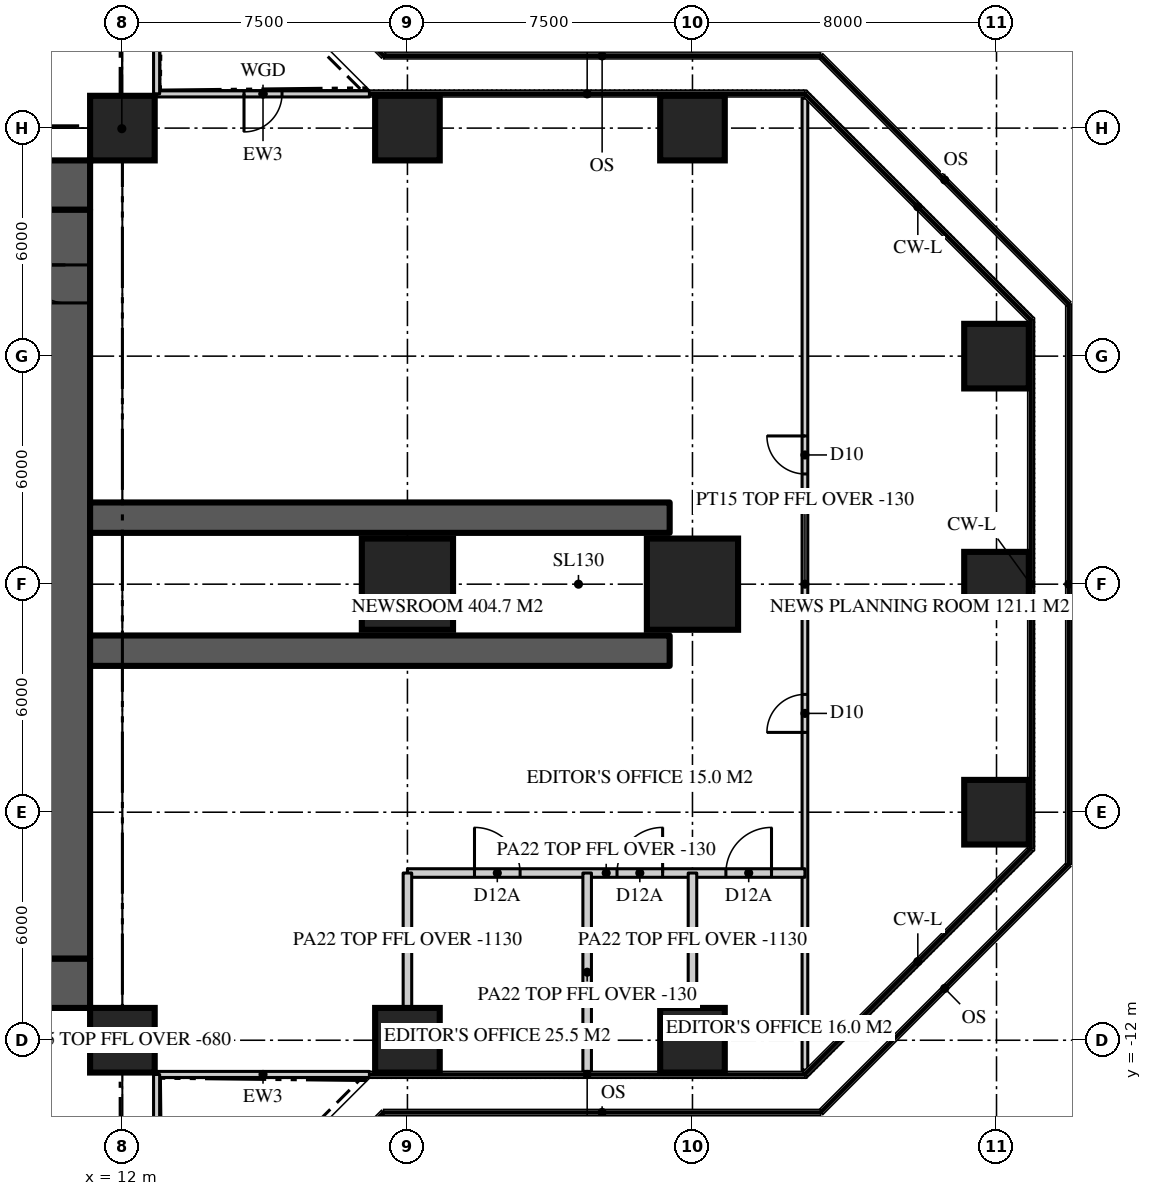
"""IFC4 building model, lengths in metres.
Left out: names, types, materials, properties, quantities, classifications, styles, units other than length and angle.
Written with IfcOpenShell. Run it as: python <this file> out.ifc"""

import sys

from ifc_helpers import new_model, si_unit, direction, frame, frame_2d, origin, origin_2d, place, context, subcontext, project, spatial, rectangle, extrude, element, fill, save


model = new_model("IFC4")
c1 = context("Model", 3, precision=1e-05, world=origin(), true_north=direction((0.0, 1.0)))
c2 = subcontext(c1, "Body", "Model", "MODEL_VIEW")
j1 = project(units=[si_unit("LENGTHUNIT", "METRE"), si_unit("PLANEANGLEUNIT", "RADIAN")], contexts=[c1])
p1 = place(None, origin())
s1 = spatial("IfcSite", under=j1, at=p1, CompositionType="ELEMENT")
p2 = place(p1, origin())
s2 = spatial("IfcBuilding", under=s1, at=p2, CompositionType="ELEMENT")
p3 = place(p2, frame((0.0, 0.0, 51.3)))
s3 = spatial("IfcBuildingStorey", under=s2, at=p3, CompositionType="ELEMENT", Elevation=51.3)
p4 = place(p3, frame((-11.15, 10.5, 0.0), z_axis=(0.0, 0.0, 1.0), x_axis=(1.0, 0.0, 0.0)))
e1 = element("IfcWall", 1, at=p4, inside=s3, PredefinedType="SHEAR", context=c2, shape_type="SweptSolid", body=[
    extrude(rectangle(XDim=22.3, YDim=1.3, at=frame_2d((11.15, 0.0))), origin(), (0.0, 0.0, 1.0), 3.9),
])
p5 = place(p4, frame((4.25, 0.0, 0.0)))
e2 = element("IfcOpeningElement", 2, at=p5, cuts=e1, PredefinedType="OPENING", context=c2, shape_type="SweptSolid", body=[
    extrude(rectangle(XDim=1.8, YDim=2.2, at=frame_2d((0.9, 1.1))), frame((0.0, 0.66, 0.0), z_axis=(0.0, -1.0, 0.0), x_axis=(1.0, 0.0, 0.0)), (0.0, 0.0, 1.0), 1.32),
])
p6 = place(p4, frame((16.25, 0.0, 0.0)))
e3 = element("IfcOpeningElement", 3, at=p6, cuts=e1, PredefinedType="OPENING", context=c2, shape_type="SweptSolid", body=[
    extrude(rectangle(XDim=1.8, YDim=2.2, at=frame_2d((0.9, 1.1))), frame((0.0, 0.66, 0.0), z_axis=(0.0, -1.0, 0.0), x_axis=(1.0, 0.0, 0.0)), (0.0, 0.0, 1.0), 1.32),
])
p7 = place(p3, frame((11.15, -10.5, 0.0), z_axis=(0.0, 0.0, 1.0), x_axis=(-1.0, 0.0, 0.0)))
e4 = element("IfcWall", 4, at=p7, inside=s3, PredefinedType="SHEAR", context=c2, shape_type="SweptSolid", body=[
    extrude(rectangle(XDim=22.3, YDim=1.3, at=frame_2d((11.15, 0.0))), origin(), (0.0, 0.0, 1.0), 3.9),
])
p8 = place(p7, frame((16.25, 0.0, 0.0)))
e5 = element("IfcOpeningElement", 5, at=p8, cuts=e4, PredefinedType="OPENING", context=c2, shape_type="SweptSolid", body=[
    extrude(rectangle(XDim=1.8, YDim=2.2, at=frame_2d((0.9, 1.1))), frame((0.0, 0.66, 0.0), z_axis=(0.0, -1.0, 0.0), x_axis=(1.0, 0.0, 0.0)), (0.0, 0.0, 1.0), 1.32),
])
p9 = place(p7, frame((4.25, 0.0, 0.0)))
e6 = element("IfcOpeningElement", 6, at=p9, cuts=e4, PredefinedType="OPENING", context=c2, shape_type="SweptSolid", body=[
    extrude(rectangle(XDim=1.8, YDim=2.2, at=frame_2d((0.9, 1.1))), frame((0.0, 0.66, 0.0), z_axis=(0.0, -1.0, 0.0), x_axis=(1.0, 0.0, 0.0)), (0.0, 0.0, 1.0), 1.32),
])
p10 = place(p3, frame((10.5, -9.85, 0.0), z_axis=(0.0, 0.0, 1.0), x_axis=(0.0, 1.0, 0.0)))
e7 = element("IfcWall", 7, at=p10, inside=s3, PredefinedType="SHEAR", context=c2, shape_type="SweptSolid", body=[
    extrude(rectangle(XDim=19.7, YDim=1.3, at=frame_2d((9.85, 0.0))), origin(), (0.0, 0.0, 1.0), 3.9),
])
p11 = place(p10, frame((17.25, 0.0, 0.0)))
e8 = element("IfcOpeningElement", 8, at=p11, cuts=e7, PredefinedType="OPENING", context=c2, shape_type="SweptSolid", body=[
    extrude(rectangle(XDim=1.0, YDim=2.2, at=frame_2d((0.5, 1.1))), frame((0.0, 0.66, 0.0), z_axis=(0.0, -1.0, 0.0), x_axis=(1.0, 0.0, 0.0)), (0.0, 0.0, 1.0), 1.32),
])
for number, where, z_axis, x_axis in (
    (9, (11.15, -1.75, 0.0), (0.0, 0.0, 1.0), (1.0, 0.0, 0.0)),
    (10, (11.15, 1.75, 0.0), (0.0, 0.0, 1.0), (1.0, 0.0, 0.0)),
):
    element("IfcWall", number, at=place(p3, frame(where, z_axis=z_axis, x_axis=x_axis)), inside=s3, PredefinedType="SHEAR", context=c2, shape_type="SweptSolid", body=[
        extrude(rectangle(XDim=15.25, YDim=0.8, at=frame_2d((7.625, 0.0))), origin(), (0.0, 0.0, 1.0), 3.9),
    ])
for number, where, z_axis, x_axis in (
    (11, (12.0, -12.0, 0.0), (0.0, 0.0, 1.0), (1.0, 0.0, 0.0)),
    (12, (19.5, -12.0, 0.0), (0.0, 0.0, 1.0), (1.0, 0.0, 0.0)),
    (13, (27.0, -12.0, 0.0), (0.0, 0.0, 1.0), (1.0, 0.0, 0.0)),
    (14, (35.0, -6.0, 0.0), (0.0, 0.0, 1.0), (1.0, 0.0, 0.0)),
):
    element("IfcColumn", number, at=place(p3, frame(where, z_axis=z_axis, x_axis=x_axis)), inside=s3, PredefinedType="COLUMN", context=c2, shape_type="SweptSolid", body=[
        extrude(rectangle(XDim=1.7, YDim=1.7, at=origin_2d()), origin(), (0.0, 0.0, 1.0), 3.9),
    ])
for number, where, z_axis, x_axis in (
    (15, (19.5, 0.0, 0.0), (0.0, 0.0, 1.0), (1.0, 0.0, 0.0)),
    (16, (27.0, 0.0, 0.0), (0.0, 0.0, 1.0), (1.0, 0.0, 0.0)),
):
    element("IfcColumn", number, at=place(p3, frame(where, z_axis=z_axis, x_axis=x_axis)), inside=s3, PredefinedType="COLUMN", context=c2, shape_type="SweptSolid", body=[
        extrude(rectangle(XDim=2.4, YDim=2.4, at=origin_2d()), origin(), (0.0, 0.0, 1.0), 3.9),
    ])
for number, where, z_axis, x_axis in (
    (17, (35.0, 0.0, 0.0), (0.0, 0.0, 1.0), (1.0, 0.0, 0.0)),
    (18, (35.0, 6.0, 0.0), (0.0, 0.0, 1.0), (1.0, 0.0, 0.0)),
    (19, (12.0, 12.0, 0.0), (0.0, 0.0, 1.0), (1.0, 0.0, 0.0)),
    (20, (19.5, 12.0, 0.0), (0.0, 0.0, 1.0), (1.0, 0.0, 0.0)),
    (21, (27.0, 12.0, 0.0), (0.0, 0.0, 1.0), (1.0, 0.0, 0.0)),
):
    element("IfcColumn", number, at=place(p3, frame(where, z_axis=z_axis, x_axis=x_axis)), inside=s3, PredefinedType="COLUMN", context=c2, shape_type="SweptSolid", body=[
        extrude(rectangle(XDim=1.7, YDim=1.7, at=origin_2d()), origin(), (0.0, 0.0, 1.0), 3.9),
    ])
p12 = place(p3, frame((12.9, -12.9, 0.0), z_axis=(0.0, 0.0, 1.0), x_axis=(1.0, 0.0, 0.0)))
e22 = element("IfcWall", 22, at=p12, inside=s3, PredefinedType="SOLIDWALL", context=c2, shape_type="SweptSolid", body=[
    extrude(rectangle(XDim=5.6, YDim=0.16, at=frame_2d((2.8, 0.0))), origin(), (0.0, 0.0, 1.0), 3.77),
])
p13 = place(p3, frame((18.5, 12.9, 0.0), z_axis=(0.0, 0.0, 1.0), x_axis=(-1.0, 0.0, 0.0)))
e23 = element("IfcWall", 23, at=p13, inside=s3, PredefinedType="SOLIDWALL", context=c2, shape_type="SweptSolid", body=[
    extrude(rectangle(XDim=5.6, YDim=0.16, at=frame_2d((2.8, 0.0))), origin(), (0.0, 0.0, 1.0), 3.77),
])
p14 = place(p13, frame((2.3, 0.0, 0.0)))
e24 = element("IfcOpeningElement", 24, at=p14, cuts=e23, PredefinedType="OPENING", context=c2, shape_type="SweptSolid", body=[
    extrude(rectangle(XDim=1.0, YDim=2.2, at=frame_2d((0.5, 1.1))), frame((0.0, 0.09, 0.0), z_axis=(0.0, -1.0, 0.0), x_axis=(1.0, 0.0, 0.0)), (0.0, 0.0, 1.0), 0.18),
])
p15 = place(p3, frame((12.9, 12.9, 0.0), z_axis=(0.0, 0.0, 1.0), x_axis=(0.0, 1.0, 0.0)))
e25 = element("IfcWall", 25, at=p15, inside=s3, PredefinedType="SOLIDWALL", context=c2, shape_type="SweptSolid", body=[
    extrude(rectangle(XDim=5.6, YDim=0.16, at=frame_2d((2.8, 0.0))), origin(), (0.0, 0.0, 1.0), 3.77),
])
p16 = place(p3, frame((12.9, -18.5, 0.0), z_axis=(0.0, 0.0, 1.0), x_axis=(0.0, 1.0, 0.0)))
e26 = element("IfcWall", 26, at=p16, inside=s3, PredefinedType="SOLIDWALL", context=c2, shape_type="SweptSolid", body=[
    extrude(rectangle(XDim=5.6, YDim=0.16, at=frame_2d((2.8, 0.0))), origin(), (0.0, 0.0, 1.0), 3.77),
])
p17 = place(p16, frame((2.3, 0.0, 0.0)))
e27 = element("IfcOpeningElement", 27, at=p17, cuts=e26, PredefinedType="OPENING", context=c2, shape_type="SweptSolid", body=[
    extrude(rectangle(XDim=1.0, YDim=2.2, at=frame_2d((0.5, 1.1))), frame((0.0, 0.09, 0.0), z_axis=(0.0, -1.0, 0.0), x_axis=(1.0, 0.0, 0.0)), (0.0, 0.0, 1.0), 0.18),
])
p18 = place(p3, frame((29.959, -12.786, 0.0), z_axis=(0.0, 0.0, 1.0), x_axis=(0.0, 1.0, 0.0)))
e28 = element("IfcWall", 28, at=p18, inside=s3, PredefinedType="PARTITIONING", context=c2, shape_type="SweptSolid", body=[
    extrude(rectangle(XDim=25.573, YDim=0.15, at=frame_2d((12.786, 0.0))), origin(), (0.0, 0.0, 1.0), 3.77),
])
p19 = place(p18, frame((15.687, 0.0, 0.0)))
e29 = element("IfcOpeningElement", 29, at=p19, cuts=e28, PredefinedType="OPENING", context=c2, shape_type="SweptSolid", body=[
    extrude(rectangle(XDim=1.0, YDim=2.2, at=frame_2d((0.5, 1.1))), frame((0.0, 0.085, 0.0), z_axis=(0.0, -1.0, 0.0), x_axis=(1.0, 0.0, 0.0)), (0.0, 0.0, 1.0), 0.17),
])
p20 = place(p18, frame((8.886, 0.0, 0.0)))
e30 = element("IfcOpeningElement", 30, at=p20, cuts=e28, PredefinedType="OPENING", context=c2, shape_type="SweptSolid", body=[
    extrude(rectangle(XDim=1.0, YDim=2.2, at=frame_2d((0.5, 1.1))), frame((0.0, 0.085, 0.0), z_axis=(0.0, -1.0, 0.0), x_axis=(1.0, 0.0, 0.0)), (0.0, 0.0, 1.0), 0.17),
])
p21 = place(p3, frame((19.5, -7.6, 0.0), z_axis=(0.0, 0.0, 1.0), x_axis=(1.0, 0.0, 0.0)))
e31 = element("IfcWall", 31, at=p21, inside=s3, PredefinedType="PARTITIONING", context=c2, shape_type="SweptSolid", body=[
    extrude(rectangle(XDim=10.459, YDim=0.225, at=frame_2d((5.229, 0.0))), origin(), (0.0, 0.0, 1.0), 3.77),
])
p22 = place(p21, frame((1.764, 0.0, 0.0)))
e32 = element("IfcOpeningElement", 32, at=p22, cuts=e31, PredefinedType="OPENING", context=c2, shape_type="SweptSolid", body=[
    extrude(rectangle(XDim=1.2, YDim=2.2, at=frame_2d((0.6, 1.1))), frame((0.0, 0.123, 0.0), z_axis=(0.0, -1.0, 0.0), x_axis=(1.0, 0.0, 0.0)), (0.0, 0.0, 1.0), 0.245),
])
p23 = place(p21, frame((5.514, 0.0, 0.0)))
e33 = element("IfcOpeningElement", 33, at=p23, cuts=e31, PredefinedType="OPENING", context=c2, shape_type="SweptSolid", body=[
    extrude(rectangle(XDim=1.2, YDim=2.2, at=frame_2d((0.6, 1.1))), frame((0.0, 0.123, 0.0), z_axis=(0.0, -1.0, 0.0), x_axis=(1.0, 0.0, 0.0)), (0.0, 0.0, 1.0), 0.245),
])
p24 = place(p21, frame((8.379, 0.0, 0.0)))
e34 = element("IfcOpeningElement", 34, at=p24, cuts=e31, PredefinedType="OPENING", context=c2, shape_type="SweptSolid", body=[
    extrude(rectangle(XDim=1.2, YDim=2.2, at=frame_2d((0.6, 1.1))), frame((0.0, 0.123, 0.0), z_axis=(0.0, -1.0, 0.0), x_axis=(1.0, 0.0, 0.0)), (0.0, 0.0, 1.0), 0.245),
])
p25 = place(p3, frame((19.5, -7.6, 0.0), z_axis=(0.0, 0.0, 1.0), x_axis=(0.0, -1.0, 0.0)))
e35 = element("IfcWall", 35, at=p25, inside=s3, PredefinedType="PARTITIONING", context=c2, shape_type="SweptSolid", body=[
    extrude(rectangle(XDim=3.55, YDim=0.225, at=frame_2d((1.775, 0.0))), origin(), (0.0, 0.0, 1.0), 2.77),
])
p26 = place(p3, frame((24.229, -7.6, 0.0), z_axis=(0.0, 0.0, 1.0), x_axis=(0.0, -1.0, 0.0)))
e36 = element("IfcWall", 36, at=p26, inside=s3, PredefinedType="PARTITIONING", context=c2, shape_type="SweptSolid", body=[
    extrude(rectangle(XDim=5.22, YDim=0.225, at=frame_2d((2.61, 0.0))), origin(), (0.0, 0.0, 1.0), 3.77),
])
p27 = place(p3, frame((27.0, -7.6, 0.0), z_axis=(0.0, 0.0, 1.0), x_axis=(0.0, -1.0, 0.0)))
e37 = element("IfcWall", 37, at=p27, inside=s3, PredefinedType="PARTITIONING", context=c2, shape_type="SweptSolid", body=[
    extrude(rectangle(XDim=3.55, YDim=0.225, at=frame_2d((1.775, 0.0))), origin(), (0.0, 0.0, 1.0), 2.77),
])
for number, where, z_axis, x_axis in (
    (38, (11.15, 11.15, 0.0), (0.0, 0.0, 1.0), (0.707, 0.707, 0.0)),
    (39, (11.15, -11.15, 0.0), (0.0, 0.0, 1.0), (0.707, -0.707, 0.0)),
):
    element("IfcWall", number, at=place(p3, frame(where, z_axis=z_axis, x_axis=x_axis)), inside=s3, PredefinedType="PARTITIONING", context=c2, shape_type="SweptSolid", body=[
        extrude(rectangle(XDim=2.362, YDim=0.15, at=frame_2d((1.181, 0.0))), origin(), (0.0, 0.0, 1.0), 3.22),
    ])
p28 = place(p14, origin())
e40 = element("IfcDoor", 40, at=p28, inside=s3, OperationType="SINGLE_SWING_RIGHT", PredefinedType="DOOR", context=c2, shape_type="SweptSolid", body=[
    extrude(rectangle(XDim=1.0, YDim=2.2, at=frame_2d((0.5, 1.1))), frame((0.0, 0.025, 0.0), z_axis=(0.0, -1.0, 0.0), x_axis=(1.0, 0.0, 0.0)), (0.0, 0.0, 1.0), 0.05),
])
fill(e24, e40)
p29 = place(p11, origin())
e41 = element("IfcDoor", 41, at=p29, inside=s3, OperationType="SINGLE_SWING_RIGHT", PredefinedType="DOOR", context=c2, shape_type="SweptSolid", body=[
    extrude(rectangle(XDim=1.0, YDim=2.2, at=frame_2d((0.5, 1.1))), frame((0.0, 0.025, 0.0), z_axis=(0.0, -1.0, 0.0), x_axis=(1.0, 0.0, 0.0)), (0.0, 0.0, 1.0), 0.05),
])
fill(e8, e41)
p30 = place(p19, origin())
e42 = element("IfcDoor", 42, at=p30, inside=s3, OperationType="SINGLE_SWING_RIGHT", PredefinedType="DOOR", context=c2, shape_type="SweptSolid", body=[
    extrude(rectangle(XDim=1.0, YDim=2.2, at=frame_2d((0.5, 1.1))), frame((0.0, 0.025, 0.0), z_axis=(0.0, -1.0, 0.0), x_axis=(1.0, 0.0, 0.0)), (0.0, 0.0, 1.0), 0.05),
])
fill(e29, e42)
p31 = place(p20, origin())
e43 = element("IfcDoor", 43, at=p31, inside=s3, OperationType="SINGLE_SWING_LEFT", PredefinedType="DOOR", context=c2, shape_type="SweptSolid", body=[
    extrude(rectangle(XDim=1.0, YDim=2.2, at=frame_2d((0.5, 1.1))), frame((0.0, 0.025, 0.0), z_axis=(0.0, -1.0, 0.0), x_axis=(1.0, 0.0, 0.0)), (0.0, 0.0, 1.0), 0.05),
])
fill(e30, e43)
p32 = place(p22, origin())
e44 = element("IfcDoor", 44, at=p32, inside=s3, OperationType="SINGLE_SWING_LEFT", PredefinedType="DOOR", context=c2, shape_type="SweptSolid", body=[
    extrude(rectangle(XDim=1.2, YDim=2.2, at=frame_2d((0.6, 1.1))), frame((0.0, 0.025, 0.0), z_axis=(0.0, -1.0, 0.0), x_axis=(1.0, 0.0, 0.0)), (0.0, 0.0, 1.0), 0.05),
])
fill(e32, e44)
p33 = place(p23, origin())
e45 = element("IfcDoor", 45, at=p33, inside=s3, OperationType="SINGLE_SWING_RIGHT", PredefinedType="DOOR", context=c2, shape_type="SweptSolid", body=[
    extrude(rectangle(XDim=1.2, YDim=2.2, at=frame_2d((0.6, 1.1))), frame((0.0, 0.025, 0.0), z_axis=(0.0, -1.0, 0.0), x_axis=(1.0, 0.0, 0.0)), (0.0, 0.0, 1.0), 0.05),
])
fill(e33, e45)
p34 = place(p24, origin())
e46 = element("IfcDoor", 46, at=p34, inside=s3, OperationType="SINGLE_SWING_RIGHT", PredefinedType="DOOR", context=c2, shape_type="SweptSolid", body=[
    extrude(rectangle(XDim=1.2, YDim=2.2, at=frame_2d((0.6, 1.1))), frame((0.0, 0.025, 0.0), z_axis=(0.0, -1.0, 0.0), x_axis=(1.0, 0.0, 0.0)), (0.0, 0.0, 1.0), 0.05),
])
fill(e34, e46)
save(model, sys.argv[1])
